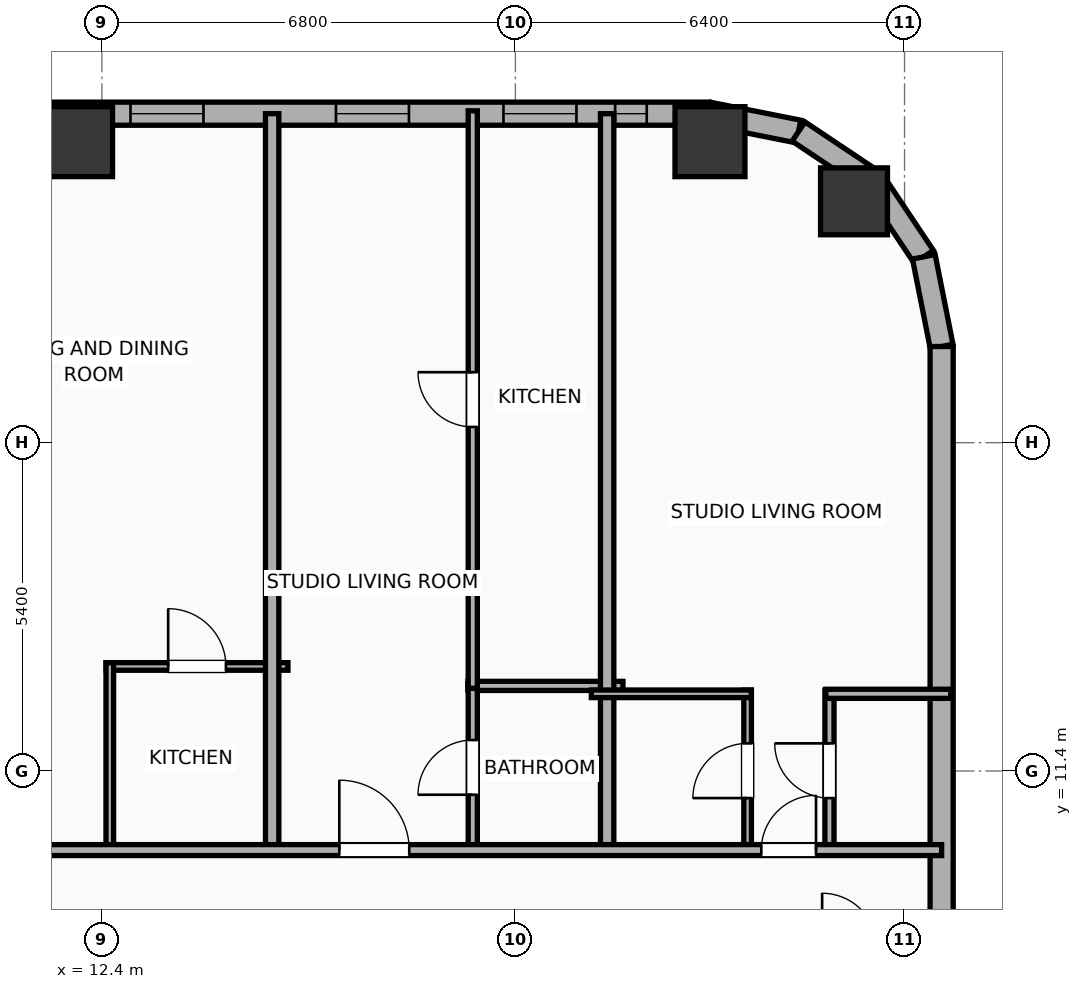
"""IFC4 building model, lengths in metres.
Left out: names, types, materials, properties, quantities, classifications, styles, units other than length and angle.
Written with IfcOpenShell. Run it as: python <this file> out.ifc"""

import sys

from ifc_helpers import new_model, si_unit, direction, frame, frame_2d, origin, origin_2d, place, context, subcontext, project, spatial, rectangle, hollow_rectangle, hollow_circle, extrude, element, fill, save


model = new_model("IFC4")
c1 = context("Model", 3, precision=1e-05, world=origin(), true_north=direction((0.0, 1.0)))
c2 = subcontext(c1, "Body", "Model", "MODEL_VIEW")
j1 = project(units=[si_unit("LENGTHUNIT", "METRE"), si_unit("PLANEANGLEUNIT", "RADIAN")], contexts=[c1])
p1 = place(None, origin())
s1 = spatial("IfcSite", under=j1, at=p1, CompositionType="ELEMENT")
p2 = place(p1, origin())
s2 = spatial("IfcBuilding", under=s1, at=p2, CompositionType="ELEMENT")
p3 = place(p2, frame((0.0, 0.0, 33.8)))
s3 = spatial("IfcBuildingStorey", under=s2, at=p3, CompositionType="ELEMENT", Elevation=33.8)
p4 = place(p3, frame((24.769, 20.769, 0.0), z_axis=(0.0, 0.0, 1.0), x_axis=(1.0, 0.0, 0.0)))
e1 = element("IfcColumn", 1, at=p4, inside=s3, PredefinedType="COLUMN", context=c2, shape_type="SweptSolid", body=[
    extrude(hollow_circle(Radius=0.55, WallThickness=0.036, at=origin_2d()), origin(), (0.0, 0.0, 1.0), 3.9),
])
for number, where, z_axis, x_axis in (
    (2, (22.4, 21.75, 0.0), (0.0, 0.0, 1.0), (1.0, 0.0, 0.0)),
    (3, (12.0, 21.75, 0.0), (0.0, 0.0, 1.0), (1.0, 0.0, 0.0)),
):
    element("IfcColumn", number, at=place(p3, frame(where, z_axis=z_axis, x_axis=x_axis)), inside=s3, PredefinedType="COLUMN", context=c2, shape_type="SweptSolid", body=[
        extrude(hollow_rectangle(XDim=1.15, YDim=1.15, WallThickness=0.04, at=origin_2d()), origin(), (0.0, 0.0, 1.0), 3.9),
    ])
p5 = place(p3, frame((-29.581, 22.21, 0.0), z_axis=(0.0, 0.0, 1.0), x_axis=(1.0, 0.0, 0.0)))
e4 = element("IfcWall", 4, at=p5, inside=s3, PredefinedType="ELEMENTEDWALL", context=c2, shape_type="SweptSolid", body=[
    extrude(rectangle(XDim=51.963, YDim=0.38, at=frame_2d((25.981, 0.0))), origin(), (0.0, 0.0, 1.0), 3.65),
])
p6 = place(p5, frame((5.81, 0.0, 0.75)))
e5 = element("IfcOpeningElement", 5, at=p6, cuts=e4, PredefinedType="OPENING", context=c2, shape_type="SweptSolid", body=[
    extrude(rectangle(XDim=2.4, YDim=2.1, at=frame_2d((1.2, 1.05))), frame((0.0, 0.2, 0.0), z_axis=(0.0, -1.0, 0.0), x_axis=(1.0, 0.0, 0.0)), (0.0, 0.0, 1.0), 0.4),
])
p7 = place(p5, frame((23.931, 0.0, 0.75)))
e6 = element("IfcOpeningElement", 6, at=p7, cuts=e4, PredefinedType="OPENING", context=c2, shape_type="SweptSolid", body=[
    extrude(rectangle(XDim=2.4, YDim=2.1, at=frame_2d((1.2, 1.05))), frame((0.0, 0.2, 0.0), z_axis=(0.0, -1.0, 0.0), x_axis=(1.0, 0.0, 0.0)), (0.0, 0.0, 1.0), 0.4),
])
p8 = place(p5, frame((3.056, 0.0, 0.75)))
e7 = element("IfcOpeningElement", 7, at=p8, cuts=e4, PredefinedType="OPENING", context=c2, shape_type="SweptSolid", body=[
    extrude(rectangle(XDim=1.2, YDim=2.05, at=frame_2d((0.6, 1.025))), frame((0.0, 0.2, 0.0), z_axis=(0.0, -1.0, 0.0), x_axis=(1.0, 0.0, 0.0)), (0.0, 0.0, 1.0), 0.4),
])
p9 = place(p5, frame((11.127, 0.0, 0.75)))
e8 = element("IfcOpeningElement", 8, at=p9, cuts=e4, PredefinedType="OPENING", context=c2, shape_type="SweptSolid", body=[
    extrude(rectangle(XDim=0.52, YDim=2.05, at=frame_2d((0.26, 1.025))), frame((0.0, 0.2, 0.0), z_axis=(0.0, -1.0, 0.0), x_axis=(1.0, 0.0, 0.0)), (0.0, 0.0, 1.0), 0.4),
])
p10 = place(p5, frame((14.327, 0.0, 0.75)))
e9 = element("IfcOpeningElement", 9, at=p10, cuts=e4, PredefinedType="OPENING", context=c2, shape_type="SweptSolid", body=[
    extrude(rectangle(XDim=1.2, YDim=2.05, at=frame_2d((0.6, 1.025))), frame((0.0, 0.2, 0.0), z_axis=(0.0, -1.0, 0.0), x_axis=(1.0, 0.0, 0.0)), (0.0, 0.0, 1.0), 0.4),
])
p11 = place(p5, frame((21.641, 0.0, 0.75)))
e10 = element("IfcOpeningElement", 10, at=p11, cuts=e4, PredefinedType="OPENING", context=c2, shape_type="SweptSolid", body=[
    extrude(rectangle(XDim=1.2, YDim=2.05, at=frame_2d((0.6, 1.025))), frame((0.0, 0.2, 0.0), z_axis=(0.0, -1.0, 0.0), x_axis=(1.0, 0.0, 0.0)), (0.0, 0.0, 1.0), 0.4),
])
p12 = place(p5, frame((18.486, 0.0, 0.75)))
e11 = element("IfcOpeningElement", 11, at=p12, cuts=e4, PredefinedType="OPENING", context=c2, shape_type="SweptSolid", body=[
    extrude(rectangle(XDim=1.2, YDim=2.05, at=frame_2d((0.6, 1.025))), frame((0.0, 0.2, 0.0), z_axis=(0.0, -1.0, 0.0), x_axis=(1.0, 0.0, 0.0)), (0.0, 0.0, 1.0), 0.4),
])
p13 = place(p5, frame((28.976, 0.0, 0.75)))
e12 = element("IfcOpeningElement", 12, at=p13, cuts=e4, PredefinedType="OPENING", context=c2, shape_type="SweptSolid", body=[
    extrude(rectangle(XDim=1.2, YDim=2.05, at=frame_2d((0.6, 1.025))), frame((0.0, 0.2, 0.0), z_axis=(0.0, -1.0, 0.0), x_axis=(1.0, 0.0, 0.0)), (0.0, 0.0, 1.0), 0.4),
])
p14 = place(p5, frame((33.476, 0.0, 0.75)))
e13 = element("IfcOpeningElement", 13, at=p14, cuts=e4, PredefinedType="OPENING", context=c2, shape_type="SweptSolid", body=[
    extrude(rectangle(XDim=1.2, YDim=2.05, at=frame_2d((0.6, 1.025))), frame((0.0, 0.2, 0.0), z_axis=(0.0, -1.0, 0.0), x_axis=(1.0, 0.0, 0.0)), (0.0, 0.0, 1.0), 0.4),
])
p15 = place(p5, frame((36.752, 0.0, 0.75)))
e14 = element("IfcOpeningElement", 14, at=p15, cuts=e4, PredefinedType="OPENING", context=c2, shape_type="SweptSolid", body=[
    extrude(rectangle(XDim=1.2, YDim=2.05, at=frame_2d((0.6, 1.025))), frame((0.0, 0.2, 0.0), z_axis=(0.0, -1.0, 0.0), x_axis=(1.0, 0.0, 0.0)), (0.0, 0.0, 1.0), 0.4),
])
p16 = place(p5, frame((42.452, 0.0, 0.75)))
e15 = element("IfcOpeningElement", 15, at=p16, cuts=e4, PredefinedType="OPENING", context=c2, shape_type="SweptSolid", body=[
    extrude(rectangle(XDim=1.2, YDim=2.05, at=frame_2d((0.6, 1.025))), frame((0.0, 0.2, 0.0), z_axis=(0.0, -1.0, 0.0), x_axis=(1.0, 0.0, 0.0)), (0.0, 0.0, 1.0), 0.4),
])
p17 = place(p5, frame((45.831, 0.0, 0.75)))
e16 = element("IfcOpeningElement", 16, at=p17, cuts=e4, PredefinedType="OPENING", context=c2, shape_type="SweptSolid", body=[
    extrude(rectangle(XDim=1.2, YDim=2.05, at=frame_2d((0.6, 1.025))), frame((0.0, 0.2, 0.0), z_axis=(0.0, -1.0, 0.0), x_axis=(1.0, 0.0, 0.0)), (0.0, 0.0, 1.0), 0.4),
])
p18 = place(p5, frame((48.585, 0.0, 0.75)))
e17 = element("IfcOpeningElement", 17, at=p18, cuts=e4, PredefinedType="OPENING", context=c2, shape_type="SweptSolid", body=[
    extrude(rectangle(XDim=1.2, YDim=2.05, at=frame_2d((0.6, 1.025))), frame((0.0, 0.2, 0.0), z_axis=(0.0, -1.0, 0.0), x_axis=(1.0, 0.0, 0.0)), (0.0, 0.0, 1.0), 0.4),
])
p19 = place(p5, frame((50.421, 0.0, 0.75)))
e18 = element("IfcOpeningElement", 18, at=p19, cuts=e4, PredefinedType="OPENING", context=c2, shape_type="SweptSolid", body=[
    extrude(rectangle(XDim=0.52, YDim=2.05, at=frame_2d((0.26, 1.025))), frame((0.0, 0.2, 0.0), z_axis=(0.0, -1.0, 0.0), x_axis=(1.0, 0.0, 0.0)), (0.0, 0.0, 1.0), 0.4),
])
p20 = place(p3, frame((22.381, 22.21, 0.0), z_axis=(0.0, 0.0, 1.0), x_axis=(0.980786132421, -0.195086038585, 0.0)))
e19 = element("IfcWall", 19, at=p20, inside=s3, PredefinedType="ELEMENTEDWALL", context=c2, shape_type="SweptSolid", body=[
    extrude(rectangle(XDim=1.504, YDim=0.38, at=frame_2d((0.752, 0.0))), origin(), (0.0, 0.0, 1.0), 3.65),
])
for number, where, z_axis, x_axis in (
    (20, (23.857, 21.917, 0.0), (0.0, 0.0, 1.0), (0.831, -0.556, 0.0)),
    (21, (25.091, 21.091, 0.0), (0.0, 0.0, 1.0), (0.556, -0.831, 0.0)),
):
    element("IfcWall", number, at=place(p3, frame(where, z_axis=z_axis, x_axis=x_axis)), inside=s3, PredefinedType="ELEMENTEDWALL", context=c2, shape_type="SweptSolid", body=[
        extrude(rectangle(XDim=1.485, YDim=0.38, at=frame_2d((0.743, 0.0))), origin(), (0.0, 0.0, 1.0), 3.65),
    ])
p21 = place(p3, frame((25.917, 19.857, 0.0), z_axis=(0.0, 0.0, 1.0), x_axis=(0.195086038585, -0.980786132421, 0.0)))
e22 = element("IfcWall", 22, at=p21, inside=s3, PredefinedType="ELEMENTEDWALL", context=c2, shape_type="SweptSolid", body=[
    extrude(rectangle(XDim=1.504, YDim=0.38, at=frame_2d((0.752, 0.0))), origin(), (0.0, 0.0, 1.0), 3.65),
])
p22 = place(p3, frame((26.21, 18.381, 0.0), z_axis=(0.0, 0.0, 1.0), x_axis=(0.0, -1.0, 0.0)))
e23 = element("IfcWall", 23, at=p22, inside=s3, PredefinedType="ELEMENTEDWALL", context=c2, shape_type="SweptSolid", body=[
    extrude(rectangle(XDim=36.763, YDim=0.38, at=frame_2d((18.381, 0.0))), origin(), (0.0, 0.0, 1.0), 3.65),
])
p23 = place(p22, frame((33.187, 0.0, 0.75)))
e24 = element("IfcOpeningElement", 24, at=p23, cuts=e23, PredefinedType="OPENING", context=c2, shape_type="SweptSolid", body=[
    extrude(rectangle(XDim=1.2, YDim=2.05, at=frame_2d((0.6, 1.025))), frame((0.0, 0.2, 0.0), z_axis=(0.0, -1.0, 0.0), x_axis=(1.0, 0.0, 0.0)), (0.0, 0.0, 1.0), 0.4),
])
p24 = place(p3, frame((12.47, 13.12, 0.0), z_axis=(0.0, 0.0, 1.0), x_axis=(1.0, 0.0, 0.0)))
e25 = element("IfcWall", 25, at=p24, inside=s3, PredefinedType="PARTITIONING", context=c2, shape_type="SweptSolid", body=[
    extrude(rectangle(XDim=2.99, YDim=0.125, at=frame_2d((1.495, 0.0))), origin(), (0.0, 0.0, 1.0), 3.65),
])
p25 = place(p24, frame((1.02, 0.0, 0.0)))
e26 = element("IfcOpeningElement", 26, at=p25, cuts=e25, PredefinedType="OPENING", context=c2, shape_type="SweptSolid", body=[
    extrude(rectangle(XDim=0.95, YDim=2.05, at=frame_2d((0.475, 1.025))), frame((0.0, 0.073, 0.0), z_axis=(0.0, -1.0, 0.0), x_axis=(1.0, 0.0, 0.0)), (0.0, 0.0, 1.0), 0.145),
])
p26 = place(p3, frame((12.53, 10.08, 0.0), z_axis=(0.0, 0.0, 1.0), x_axis=(0.0, 1.0, 0.0)))
e27 = element("IfcWall", 27, at=p26, inside=s3, PredefinedType="PARTITIONING", context=c2, shape_type="SweptSolid", body=[
    extrude(rectangle(XDim=3.1, YDim=0.125, at=frame_2d((1.55, 0.0))), origin(), (0.0, 0.0, 1.0), 2.94),
])
p27 = place(p3, frame((15.2, 10.02, 0.0), z_axis=(0.0, 0.0, 1.0), x_axis=(0.0, 1.0, 0.0)))
e28 = element("IfcWall", 28, at=p27, inside=s3, PredefinedType="PARTITIONING", context=c2, shape_type="SweptSolid", body=[
    extrude(rectangle(XDim=12.19, YDim=0.22, at=frame_2d((6.095, 0.0))), origin(), (0.0, 0.0, 1.0), 3.65),
])
p28 = place(p3, frame((18.419, 12.8, 0.0), z_axis=(0.0, 0.0, 1.0), x_axis=(1.0, 0.0, 0.0)))
e29 = element("IfcWall", 29, at=p28, inside=s3, PredefinedType="PLUMBINGWALL", context=c2, shape_type="SweptSolid", body=[
    extrude(rectangle(XDim=2.55, YDim=0.15, at=frame_2d((1.275, 0.0))), origin(), (0.0, 0.0, 1.0), 3.65),
])
p29 = place(p3, frame((18.499, 10.08, 0.0), z_axis=(0.0, 0.0, 1.0), x_axis=(0.0, 1.0, 0.0)))
e30 = element("IfcWall", 30, at=p29, inside=s3, PredefinedType="PLUMBINGWALL", context=c2, shape_type="SweptSolid", body=[
    extrude(rectangle(XDim=2.76, YDim=0.15, at=frame_2d((1.38, 0.0))), origin(), (0.0, 0.0, 1.0), 3.65),
])
p30 = place(p29, frame((0.93, 0.0, 0.0)))
e31 = element("IfcOpeningElement", 31, at=p30, cuts=e30, PredefinedType="OPENING", context=c2, shape_type="SweptSolid", body=[
    extrude(rectangle(XDim=0.9, YDim=2.05, at=frame_2d((0.45, 1.025))), frame((0.0, 0.085, 0.0), z_axis=(0.0, -1.0, 0.0), x_axis=(1.0, 0.0, 0.0)), (0.0, 0.0, 1.0), 0.17),
])
p31 = place(p3, frame((18.499, 12.76, 0.0), z_axis=(0.0, 0.0, 1.0), x_axis=(0.0, 1.0, 0.0)))
e32 = element("IfcWall", 32, at=p31, inside=s3, PredefinedType="PLUMBINGWALL", context=c2, shape_type="SweptSolid", body=[
    extrude(rectangle(XDim=9.498, YDim=0.15, at=frame_2d((4.749, 0.0))), origin(), (0.0, 0.0, 1.0), 3.65),
])
p32 = place(p31, frame((4.299, 0.0, 0.0)))
e33 = element("IfcOpeningElement", 33, at=p32, cuts=e32, PredefinedType="OPENING", context=c2, shape_type="SweptSolid", body=[
    extrude(rectangle(XDim=0.9, YDim=2.05, at=frame_2d((0.45, 1.025))), frame((0.0, 0.085, 0.0), z_axis=(0.0, -1.0, 0.0), x_axis=(1.0, 0.0, 0.0)), (0.0, 0.0, 1.0), 0.17),
])
p33 = place(p3, frame((20.709, 10.02, 0.0), z_axis=(0.0, 0.0, 1.0), x_axis=(0.0, 1.0, 0.0)))
e34 = element("IfcWall", 34, at=p33, inside=s3, PredefinedType="PARTITIONING", context=c2, shape_type="SweptSolid", body=[
    extrude(rectangle(XDim=12.19, YDim=0.22, at=frame_2d((6.095, 0.0))), origin(), (0.0, 0.0, 1.0), 2.94),
])
p34 = place(p3, frame((23.019, 10.08, 0.0), z_axis=(0.0, 0.0, 1.0), x_axis=(0.0, 1.0, 0.0)))
e35 = element("IfcWall", 35, at=p34, inside=s3, PredefinedType="PARTITIONING", context=c2, shape_type="SweptSolid", body=[
    extrude(rectangle(XDim=2.65, YDim=0.125, at=frame_2d((1.325, 0.0))), origin(), (0.0, 0.0, 1.0), 3.65),
])
p35 = place(p34, frame((0.875, 0.0, 0.0)))
e36 = element("IfcOpeningElement", 36, at=p35, cuts=e35, PredefinedType="OPENING", context=c2, shape_type="SweptSolid", body=[
    extrude(rectangle(XDim=0.9, YDim=2.05, at=frame_2d((0.45, 1.025))), frame((0.0, 0.073, 0.0), z_axis=(0.0, -1.0, 0.0), x_axis=(1.0, 0.0, 0.0)), (0.0, 0.0, 1.0), 0.145),
])
p36 = place(p3, frame((24.365, 10.08, 0.0), z_axis=(0.0, 0.0, 1.0), x_axis=(0.0, 1.0, 0.0)))
e37 = element("IfcWall", 37, at=p36, inside=s3, PredefinedType="PLUMBINGWALL", context=c2, shape_type="SweptSolid", body=[
    extrude(rectangle(XDim=2.65, YDim=0.15, at=frame_2d((1.325, 0.0))), origin(), (0.0, 0.0, 1.0), 3.65),
])
p37 = place(p36, frame((0.875, 0.0, 0.0)))
e38 = element("IfcOpeningElement", 38, at=p37, cuts=e37, PredefinedType="OPENING", context=c2, shape_type="SweptSolid", body=[
    extrude(rectangle(XDim=0.9, YDim=2.05, at=frame_2d((0.45, 1.025))), frame((0.0, 0.085, 0.0), z_axis=(0.0, -1.0, 0.0), x_axis=(1.0, 0.0, 0.0)), (0.0, 0.0, 1.0), 0.17),
])
p38 = place(p3, frame((20.449, 12.67, 0.0), z_axis=(0.0, 0.0, 1.0), x_axis=(1.0, 0.0, 0.0)))
e39 = element("IfcWall", 39, at=p38, inside=s3, PredefinedType="PARTITIONING", context=c2, shape_type="SweptSolid", body=[
    extrude(rectangle(XDim=2.63, YDim=0.125, at=frame_2d((1.315, 0.0))), origin(), (0.0, 0.0, 1.0), 3.65),
])
p39 = place(p3, frame((24.305, 12.67, 0.0), z_axis=(0.0, 0.0, 1.0), x_axis=(1.0, 0.0, 0.0)))
e40 = element("IfcWall", 40, at=p39, inside=s3, PredefinedType="PLUMBINGWALL", context=c2, shape_type="SweptSolid", body=[
    extrude(rectangle(XDim=2.055, YDim=0.15, at=frame_2d((1.028, 0.0))), origin(), (0.0, 0.0, 1.0), 3.65),
])
p40 = place(p3, frame((-33.41, 10.1, 0.0), z_axis=(0.0, 0.0, 1.0), x_axis=(1.0, 0.0, 0.0)))
e41 = element("IfcWall", 41, at=p40, inside=s3, PredefinedType="PARTITIONING", context=c2, shape_type="SweptSolid", body=[
    extrude(rectangle(XDim=59.62, YDim=0.18, at=frame_2d((29.81, 0.0))), origin(), (0.0, 0.0, 1.0), 3.65),
])
p41 = place(p40, frame((2.793, 0.0, 0.0)))
e42 = element("IfcOpeningElement", 42, at=p41, cuts=e41, PredefinedType="OPENING", context=c2, shape_type="SweptSolid", body=[
    extrude(rectangle(XDim=0.9, YDim=2.05, at=frame_2d((0.45, 1.025))), frame((0.0, 0.1, 0.0), z_axis=(0.0, -1.0, 0.0), x_axis=(1.0, 0.0, 0.0)), (0.0, 0.0, 1.0), 0.2),
])
p42 = place(p40, frame((10.037, 0.0, 0.0)))
e43 = element("IfcOpeningElement", 43, at=p42, cuts=e41, PredefinedType="OPENING", context=c2, shape_type="SweptSolid", body=[
    extrude(rectangle(XDim=1.15, YDim=2.05, at=frame_2d((0.575, 1.025))), frame((0.0, 0.1, 0.0), z_axis=(0.0, -1.0, 0.0), x_axis=(1.0, 0.0, 0.0)), (0.0, 0.0, 1.0), 0.2),
])
p43 = place(p40, frame((16.882, 0.0, 0.0)))
e44 = element("IfcOpeningElement", 44, at=p43, cuts=e41, PredefinedType="OPENING", context=c2, shape_type="SweptSolid", body=[
    extrude(rectangle(XDim=1.15, YDim=2.05, at=frame_2d((0.575, 1.025))), frame((0.0, 0.1, 0.0), z_axis=(0.0, -1.0, 0.0), x_axis=(1.0, 0.0, 0.0)), (0.0, 0.0, 1.0), 0.2),
])
p44 = place(p40, frame((25.801, 0.0, 0.0)))
e45 = element("IfcOpeningElement", 45, at=p44, cuts=e41, PredefinedType="OPENING", context=c2, shape_type="SweptSolid", body=[
    extrude(rectangle(XDim=1.15, YDim=2.05, at=frame_2d((0.575, 1.025))), frame((0.0, 0.1, 0.0), z_axis=(0.0, -1.0, 0.0), x_axis=(1.0, 0.0, 0.0)), (0.0, 0.0, 1.0), 0.2),
])
p45 = place(p40, frame((34.72, 0.0, 0.0)))
e46 = element("IfcOpeningElement", 46, at=p45, cuts=e41, PredefinedType="OPENING", context=c2, shape_type="SweptSolid", body=[
    extrude(rectangle(XDim=1.15, YDim=2.05, at=frame_2d((0.575, 1.025))), frame((0.0, 0.1, 0.0), z_axis=(0.0, -1.0, 0.0), x_axis=(1.0, 0.0, 0.0)), (0.0, 0.0, 1.0), 0.2),
])
p46 = place(p40, frame((43.771, 0.0, 0.0)))
e47 = element("IfcOpeningElement", 47, at=p46, cuts=e41, PredefinedType="OPENING", context=c2, shape_type="SweptSolid", body=[
    extrude(rectangle(XDim=1.15, YDim=2.05, at=frame_2d((0.575, 1.025))), frame((0.0, 0.1, 0.0), z_axis=(0.0, -1.0, 0.0), x_axis=(1.0, 0.0, 0.0)), (0.0, 0.0, 1.0), 0.2),
])
p47 = place(p40, frame((49.715, 0.0, 0.0)))
e48 = element("IfcOpeningElement", 48, at=p47, cuts=e41, PredefinedType="OPENING", context=c2, shape_type="SweptSolid", body=[
    extrude(rectangle(XDim=1.15, YDim=2.05, at=frame_2d((0.575, 1.025))), frame((0.0, 0.1, 0.0), z_axis=(0.0, -1.0, 0.0), x_axis=(1.0, 0.0, 0.0)), (0.0, 0.0, 1.0), 0.2),
])
p48 = place(p40, frame((56.654, 0.0, 0.0)))
e49 = element("IfcOpeningElement", 49, at=p48, cuts=e41, PredefinedType="OPENING", context=c2, shape_type="SweptSolid", body=[
    extrude(rectangle(XDim=0.9, YDim=2.05, at=frame_2d((0.45, 1.025))), frame((0.0, 0.1, 0.0), z_axis=(0.0, -1.0, 0.0), x_axis=(1.0, 0.0, 0.0)), (0.0, 0.0, 1.0), 0.2),
])
p49 = place(p16, origin())
e50 = element("IfcWindow", 50, at=p49, inside=s3, PartitioningType="SINGLE_PANEL", PredefinedType="WINDOW", context=c2, shape_type="SweptSolid", body=[
    extrude(rectangle(XDim=1.2, YDim=2.05, at=frame_2d((0.6, 1.025))), frame((0.0, 0.03, 0.0), z_axis=(0.0, -1.0, 0.0), x_axis=(1.0, 0.0, 0.0)), (0.0, 0.0, 1.0), 0.06),
])
fill(e15, e50)
p50 = place(p17, origin())
e51 = element("IfcWindow", 51, at=p50, inside=s3, PartitioningType="SINGLE_PANEL", PredefinedType="WINDOW", context=c2, shape_type="SweptSolid", body=[
    extrude(rectangle(XDim=1.2, YDim=2.05, at=frame_2d((0.6, 1.025))), frame((0.0, 0.03, 0.0), z_axis=(0.0, -1.0, 0.0), x_axis=(1.0, 0.0, 0.0)), (0.0, 0.0, 1.0), 0.06),
])
fill(e16, e51)
p51 = place(p18, origin())
e52 = element("IfcWindow", 52, at=p51, inside=s3, PartitioningType="SINGLE_PANEL", PredefinedType="WINDOW", context=c2, shape_type="SweptSolid", body=[
    extrude(rectangle(XDim=1.2, YDim=2.05, at=frame_2d((0.6, 1.025))), frame((0.0, 0.03, 0.0), z_axis=(0.0, -1.0, 0.0), x_axis=(1.0, 0.0, 0.0)), (0.0, 0.0, 1.0), 0.06),
])
fill(e17, e52)
p52 = place(p19, origin())
e53 = element("IfcWindow", 53, at=p52, inside=s3, PartitioningType="SINGLE_PANEL", PredefinedType="WINDOW", context=c2, shape_type="SweptSolid", body=[
    extrude(rectangle(XDim=0.52, YDim=2.05, at=frame_2d((0.26, 1.025))), frame((0.0, 0.03, 0.0), z_axis=(0.0, -1.0, 0.0), x_axis=(1.0, 0.0, 0.0)), (0.0, 0.0, 1.0), 0.06),
])
fill(e18, e53)
p53 = place(p25, origin())
e54 = element("IfcDoor", 54, at=p53, inside=s3, OperationType="SINGLE_SWING_LEFT", PredefinedType="DOOR", context=c2, shape_type="SweptSolid", body=[
    extrude(rectangle(XDim=0.95, YDim=2.05, at=frame_2d((0.475, 1.025))), frame((0.0, 0.025, 0.0), z_axis=(0.0, -1.0, 0.0), x_axis=(1.0, 0.0, 0.0)), (0.0, 0.0, 1.0), 0.05),
])
fill(e26, e54)
p54 = place(p30, origin())
e55 = element("IfcDoor", 55, at=p54, inside=s3, OperationType="SINGLE_SWING_LEFT", PredefinedType="DOOR", context=c2, shape_type="SweptSolid", body=[
    extrude(rectangle(XDim=0.9, YDim=2.05, at=frame_2d((0.45, 1.025))), frame((0.0, 0.025, 0.0), z_axis=(0.0, -1.0, 0.0), x_axis=(1.0, 0.0, 0.0)), (0.0, 0.0, 1.0), 0.05),
])
fill(e31, e55)
p55 = place(p32, origin())
e56 = element("IfcDoor", 56, at=p55, inside=s3, OperationType="SINGLE_SWING_RIGHT", PredefinedType="DOOR", context=c2, shape_type="SweptSolid", body=[
    extrude(rectangle(XDim=0.9, YDim=2.05, at=frame_2d((0.45, 1.025))), frame((0.0, 0.025, 0.0), z_axis=(0.0, -1.0, 0.0), x_axis=(1.0, 0.0, 0.0)), (0.0, 0.0, 1.0), 0.05),
])
fill(e33, e56)
p56 = place(p35, origin())
e57 = element("IfcDoor", 57, at=p56, inside=s3, OperationType="SINGLE_SWING_LEFT", PredefinedType="DOOR", context=c2, shape_type="SweptSolid", body=[
    extrude(rectangle(XDim=0.9, YDim=2.05, at=frame_2d((0.45, 1.025))), frame((0.0, 0.025, 0.0), z_axis=(0.0, -1.0, 0.0), x_axis=(1.0, 0.0, 0.0)), (0.0, 0.0, 1.0), 0.05),
])
fill(e36, e57)
p57 = place(p37, origin())
e58 = element("IfcDoor", 58, at=p57, inside=s3, OperationType="SINGLE_SWING_RIGHT", PredefinedType="DOOR", context=c2, shape_type="SweptSolid", body=[
    extrude(rectangle(XDim=0.9, YDim=2.05, at=frame_2d((0.45, 1.025))), frame((0.0, 0.025, 0.0), z_axis=(0.0, -1.0, 0.0), x_axis=(1.0, 0.0, 0.0)), (0.0, 0.0, 1.0), 0.05),
])
fill(e38, e58)
p58 = place(p47, origin())
e59 = element("IfcDoor", 59, at=p58, inside=s3, OperationType="SINGLE_SWING_LEFT", PredefinedType="DOOR", context=c2, shape_type="SweptSolid", body=[
    extrude(rectangle(XDim=1.15, YDim=2.05, at=frame_2d((0.575, 1.025))), frame((0.0, 0.025, 0.0), z_axis=(0.0, -1.0, 0.0), x_axis=(1.0, 0.0, 0.0)), (0.0, 0.0, 1.0), 0.05),
])
fill(e48, e59)
p59 = place(p48, origin())
e60 = element("IfcDoor", 60, at=p59, inside=s3, OperationType="SINGLE_SWING_RIGHT", PredefinedType="DOOR", context=c2, shape_type="SweptSolid", body=[
    extrude(rectangle(XDim=0.9, YDim=2.05, at=frame_2d((0.45, 1.025))), frame((0.0, 0.025, 0.0), z_axis=(0.0, -1.0, 0.0), x_axis=(1.0, 0.0, 0.0)), (0.0, 0.0, 1.0), 0.05),
])
fill(e49, e60)
save(model, sys.argv[1])
